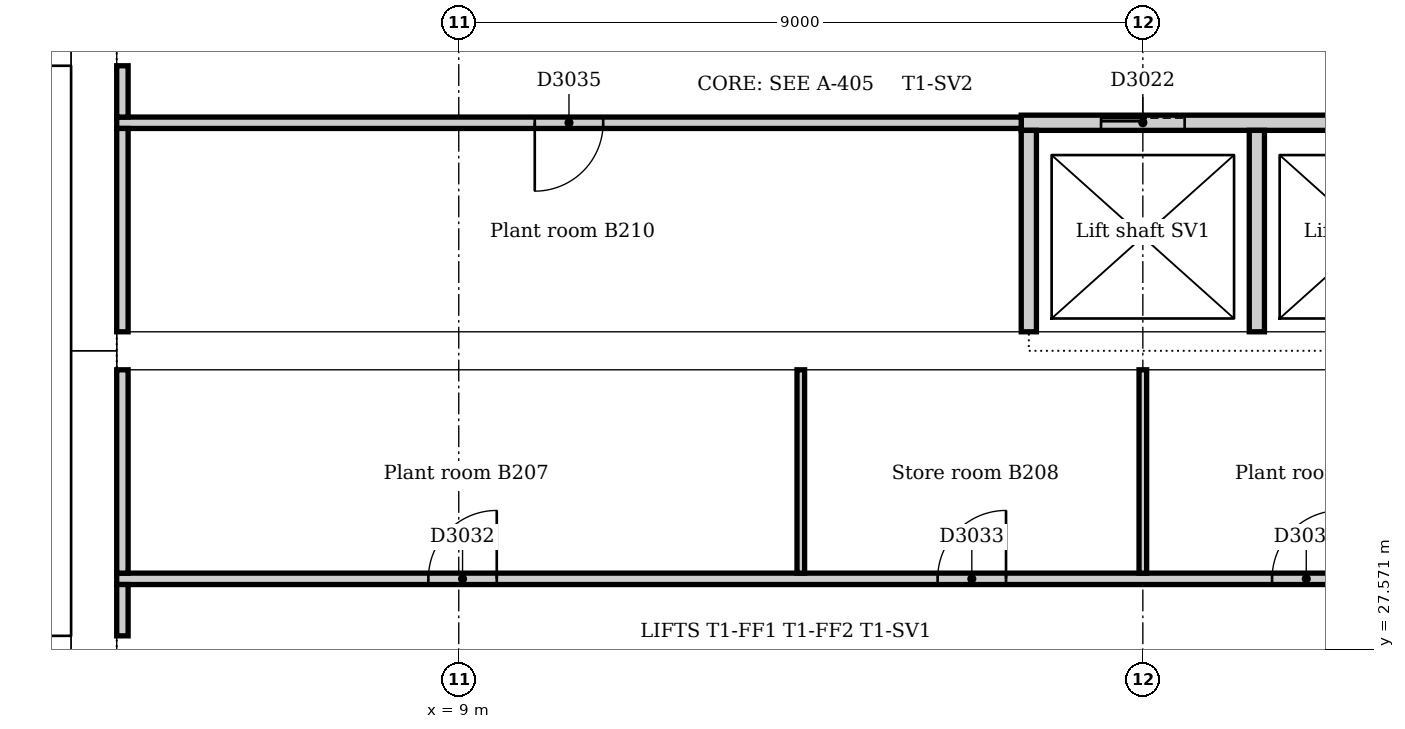
"""IFC4 building model, lengths in metres.
Left out: names, types, materials, properties, quantities, classifications, styles, units other than length and angle.
Written with IfcOpenShell. Run it as: python <this file> out.ifc"""

import sys

from ifc_helpers import new_model, si_unit, direction, frame, frame_2d, origin, place, context, subcontext, project, spatial, rectangle, extrude, element, fill, save


model = new_model("IFC4")
c1 = context("Model", 3, precision=1e-05, world=origin(), true_north=direction((0.0, 1.0)))
c2 = subcontext(c1, "Body", "Model", "MODEL_VIEW")
j1 = project(units=[si_unit("LENGTHUNIT", "METRE"), si_unit("PLANEANGLEUNIT", "RADIAN")], contexts=[c1])
p1 = place(None, origin())
s1 = spatial("IfcSite", under=j1, at=p1, CompositionType="ELEMENT")
p2 = place(p1, origin())
s2 = spatial("IfcBuilding", under=s1, at=p2, CompositionType="ELEMENT")
p3 = place(p2, frame((0.0, 0.0, -9.5)))
s3 = spatial("IfcBuildingStorey", under=s2, at=p3, CompositionType="ELEMENT", Elevation=-9.5)
p4 = place(p3, frame((4.2, 42.0, 0.0), z_axis=(0.0, 0.0, 1.0), x_axis=(0.0, -1.0, 0.0)))
e1 = element("IfcWall", 1, at=p4, inside=s3, PredefinedType="SOLIDWALL", context=c2, shape_type="SweptSolid", body=[
    extrude(rectangle(XDim=10.5, YDim=0.6, at=frame_2d((5.25, 0.0))), origin(), (0.0, 0.0, 1.0), 4.5),
])
p5 = place(p4, frame((5.3, 0.0, 0.0)))
e2 = element("IfcOpeningElement", 2, at=p5, cuts=e1, PredefinedType="OPENING", context=c2, shape_type="SweptSolid", body=[
    extrude(rectangle(XDim=1.0, YDim=2.1, at=frame_2d((0.5, 1.05))), frame((0.0, 0.31, 0.0), z_axis=(0.0, -1.0, 0.0), x_axis=(1.0, 0.0, 0.0)), (0.0, 0.0, 1.0), 0.62),
])
p6 = place(p3, frame((4.2, 31.5, 0.0), z_axis=(0.0, 0.0, 1.0), x_axis=(0.0, -1.0, 0.0)))
e3 = element("IfcWall", 3, at=p6, inside=s3, PredefinedType="SOLIDWALL", context=c2, shape_type="SweptSolid", body=[
    extrude(rectangle(XDim=10.5, YDim=0.6, at=frame_2d((5.25, 0.0))), origin(), (0.0, 0.0, 1.0), 4.5),
])
p7 = place(p6, frame((4.25, 0.0, 0.0)))
e4 = element("IfcOpeningElement", 4, at=p7, cuts=e3, PredefinedType="OPENING", context=c2, shape_type="SweptSolid", body=[
    extrude(rectangle(XDim=1.0, YDim=2.1, at=frame_2d((0.5, 1.05))), frame((0.0, 0.31, 0.0), z_axis=(0.0, -1.0, 0.0), x_axis=(1.0, 0.0, 0.0)), (0.0, 0.0, 1.0), 0.62),
])
p8 = place(p3, frame((4.5, 31.5, 0.0), z_axis=(0.0, 0.0, 1.0), x_axis=(1.0, 0.0, 0.0)))
e5 = element("IfcWall", 5, at=p8, inside=s3, PredefinedType="SOLIDWALL", context=c2, shape_type="SweptSolid", body=[
    extrude(rectangle(XDim=18.0, YDim=0.5, at=frame_2d((9.0, 0.0))), origin(), (0.0, 0.0, 1.0), 4.5),
])
p9 = place(p3, frame((3.9, 27.625, 0.0), z_axis=(0.0, 0.0, 1.0), x_axis=(-1.0, 0.0, 0.0)))
e6 = element("IfcWall", 6, at=p9, inside=s3, PredefinedType="SOLIDWALL", context=c2, shape_type="SweptSolid", body=[
    extrude(rectangle(XDim=3.54, YDim=0.25, at=frame_2d((1.77, 0.0))), origin(), (0.0, 0.0, 1.0), 4.5),
])
p10 = place(p9, frame((0.4, 0.0, 0.0)))
e7 = element("IfcOpeningElement", 7, at=p10, cuts=e6, PredefinedType="OPENING", context=c2, shape_type="SweptSolid", body=[
    extrude(rectangle(XDim=1.0, YDim=2.1, at=frame_2d((0.5, 1.05))), frame((0.0, 0.135, 0.0), z_axis=(0.0, -1.0, 0.0), x_axis=(1.0, 0.0, 0.0)), (0.0, 0.0, 1.0), 0.27),
])
p11 = place(p3, frame((0.36, 35.375, 0.0), z_axis=(0.0, 0.0, 1.0), x_axis=(1.0, 0.0, 0.0)))
e8 = element("IfcWall", 8, at=p11, inside=s3, PredefinedType="SOLIDWALL", context=c2, shape_type="SweptSolid", body=[
    extrude(rectangle(XDim=3.54, YDim=0.25, at=frame_2d((1.77, 0.0))), origin(), (0.0, 0.0, 1.0), 4.5),
])
p12 = place(p11, frame((2.14, 0.0, 0.0)))
e9 = element("IfcOpeningElement", 9, at=p12, cuts=e8, PredefinedType="OPENING", context=c2, shape_type="SweptSolid", body=[
    extrude(rectangle(XDim=1.0, YDim=2.1, at=frame_2d((0.5, 1.05))), frame((0.0, 0.135, 0.0), z_axis=(0.0, -1.0, 0.0), x_axis=(1.0, 0.0, 0.0)), (0.0, 0.0, 1.0), 0.27),
])
p13 = place(p3, frame((16.4, 34.5, 0.0), z_axis=(0.0, 0.0, 1.0), x_axis=(1.0, 0.0, 0.0)))
e10 = element("IfcWall", 10, at=p13, inside=s3, PredefinedType="PARTITIONING", context=c2, shape_type="SweptSolid", body=[
    extrude(rectangle(XDim=6.1, YDim=0.2, at=frame_2d((3.05, 0.0))), origin(), (0.0, 0.0, 1.0), 4.15),
])
p14 = place(p13, frame((1.05, 0.0, 0.0)))
e11 = element("IfcOpeningElement", 11, at=p14, cuts=e10, PredefinedType="OPENING", context=c2, shape_type="SweptSolid", body=[
    extrude(rectangle(XDim=1.1, YDim=2.1, at=frame_2d((0.55, 1.05))), frame((0.0, 0.11, 0.0), z_axis=(0.0, -1.0, 0.0), x_axis=(1.0, 0.0, 0.0)), (0.0, 0.0, 1.0), 0.22),
])
p15 = place(p13, frame((4.05, 0.0, 0.0)))
e12 = element("IfcOpeningElement", 12, at=p15, cuts=e10, PredefinedType="OPENING", context=c2, shape_type="SweptSolid", body=[
    extrude(rectangle(XDim=1.1, YDim=2.1, at=frame_2d((0.55, 1.05))), frame((0.0, 0.11, 0.0), z_axis=(0.0, -1.0, 0.0), x_axis=(1.0, 0.0, 0.0)), (0.0, 0.0, 1.0), 0.22),
])
for number, where, z_axis, x_axis in (
    (13, (16.5, 31.75, 0.0), (0.0, 0.0, 1.0), (0.0, 1.0, 0.0)),
    (14, (19.5, 31.75, 0.0), (0.0, 0.0, 1.0), (0.0, 1.0, 0.0)),
):
    element("IfcWall", number, at=place(p3, frame(where, z_axis=z_axis, x_axis=x_axis)), inside=s3, PredefinedType="PARTITIONING", context=c2, shape_type="SweptSolid", body=[
        extrude(rectangle(XDim=2.65, YDim=0.2, at=frame_2d((1.325, 0.0))), origin(), (0.0, 0.0, 1.0), 4.15),
    ])
p16 = place(p3, frame((4.5, 28.5, 0.0), z_axis=(0.0, 0.0, 1.0), x_axis=(1.0, 0.0, 0.0)))
e15 = element("IfcWall", 15, at=p16, inside=s3, PredefinedType="PARTITIONING", context=c2, shape_type="SweptSolid", body=[
    extrude(rectangle(XDim=18.0, YDim=0.15, at=frame_2d((9.0, 0.0))), origin(), (0.0, 0.0, 1.0), 4.15),
])
p17 = place(p16, frame((4.1, 0.0, 0.0)))
e16 = element("IfcOpeningElement", 16, at=p17, cuts=e15, PredefinedType="OPENING", context=c2, shape_type="SweptSolid", body=[
    extrude(rectangle(XDim=0.9, YDim=2.1, at=frame_2d((0.45, 1.05))), frame((0.0, 0.085, 0.0), z_axis=(0.0, -1.0, 0.0), x_axis=(1.0, 0.0, 0.0)), (0.0, 0.0, 1.0), 0.17),
])
p18 = place(p16, frame((10.8, 0.0, 0.0)))
e17 = element("IfcOpeningElement", 17, at=p18, cuts=e15, PredefinedType="OPENING", context=c2, shape_type="SweptSolid", body=[
    extrude(rectangle(XDim=0.9, YDim=2.1, at=frame_2d((0.45, 1.05))), frame((0.0, 0.085, 0.0), z_axis=(0.0, -1.0, 0.0), x_axis=(1.0, 0.0, 0.0)), (0.0, 0.0, 1.0), 0.17),
])
p19 = place(p16, frame((15.2, 0.0, 0.0)))
e18 = element("IfcOpeningElement", 18, at=p19, cuts=e15, PredefinedType="OPENING", context=c2, shape_type="SweptSolid", body=[
    extrude(rectangle(XDim=0.9, YDim=2.1, at=frame_2d((0.45, 1.05))), frame((0.0, 0.085, 0.0), z_axis=(0.0, -1.0, 0.0), x_axis=(1.0, 0.0, 0.0)), (0.0, 0.0, 1.0), 0.17),
])
p20 = place(p3, frame((4.5, 34.5, 0.0), z_axis=(0.0, 0.0, 1.0), x_axis=(1.0, 0.0, 0.0)))
e19 = element("IfcWall", 19, at=p20, inside=s3, PredefinedType="PARTITIONING", context=c2, shape_type="SweptSolid", body=[
    extrude(rectangle(XDim=11.9, YDim=0.15, at=frame_2d((5.95, 0.0))), origin(), (0.0, 0.0, 1.0), 4.15),
])
p21 = place(p20, frame((5.5, 0.0, 0.0)))
e20 = element("IfcOpeningElement", 20, at=p21, cuts=e19, PredefinedType="OPENING", context=c2, shape_type="SweptSolid", body=[
    extrude(rectangle(XDim=0.9, YDim=2.1, at=frame_2d((0.45, 1.05))), frame((0.0, 0.085, 0.0), z_axis=(0.0, -1.0, 0.0), x_axis=(1.0, 0.0, 0.0)), (0.0, 0.0, 1.0), 0.17),
])
p22 = place(p3, frame((4.575, 34.575, 0.0), z_axis=(0.0, 0.0, 1.0), x_axis=(0.0, 1.0, 0.0)))
e21 = element("IfcWall", 21, at=p22, inside=s3, PredefinedType="PARTITIONING", context=c2, shape_type="SweptSolid", body=[
    extrude(rectangle(XDim=0.675, YDim=0.15, at=frame_2d((0.338, 0.0))), origin(), (0.0, 0.0, 1.0), 4.15),
])
p23 = place(p3, frame((4.575, 31.75, 0.0), z_axis=(0.0, 0.0, 1.0), x_axis=(0.0, 1.0, 0.0)))
e22 = element("IfcWall", 22, at=p23, inside=s3, PredefinedType="PARTITIONING", context=c2, shape_type="SweptSolid", body=[
    extrude(rectangle(XDim=2.675, YDim=0.15, at=frame_2d((1.337, 0.0))), origin(), (0.0, 0.0, 1.0), 4.15),
])
p24 = place(p3, frame((4.575, 27.75, 0.0), z_axis=(0.0, 0.0, 1.0), x_axis=(0.0, 1.0, 0.0)))
e23 = element("IfcWall", 23, at=p24, inside=s3, PredefinedType="PARTITIONING", context=c2, shape_type="SweptSolid", body=[
    extrude(rectangle(XDim=0.675, YDim=0.15, at=frame_2d((0.338, 0.0))), origin(), (0.0, 0.0, 1.0), 4.15),
])
p25 = place(p3, frame((4.575, 28.575, 0.0), z_axis=(0.0, 0.0, 1.0), x_axis=(0.0, 1.0, 0.0)))
e24 = element("IfcWall", 24, at=p25, inside=s3, PredefinedType="PARTITIONING", context=c2, shape_type="SweptSolid", body=[
    extrude(rectangle(XDim=2.675, YDim=0.15, at=frame_2d((1.337, 0.0))), origin(), (0.0, 0.0, 1.0), 4.15),
])
for number, where, z_axis, x_axis in (
    (25, (13.5, 28.575, 0.0), (0.0, 0.0, 1.0), (0.0, 1.0, 0.0)),
    (26, (18.0, 28.575, 0.0), (0.0, 0.0, 1.0), (0.0, 1.0, 0.0)),
):
    element("IfcWall", number, at=place(p3, frame(where, z_axis=z_axis, x_axis=x_axis)), inside=s3, PredefinedType="PARTITIONING", context=c2, shape_type="SweptSolid", body=[
        extrude(rectangle(XDim=2.675, YDim=0.1, at=frame_2d((1.337, 0.0))), origin(), (0.0, 0.0, 1.0), 4.15),
    ])
p26 = place(p14, origin())
e27 = element("IfcDoor", 27, at=p26, inside=s3, OperationType="SLIDING_TO_LEFT", PredefinedType="DOOR", context=c2, shape_type="SweptSolid", body=[
    extrude(rectangle(XDim=1.1, YDim=2.1, at=frame_2d((0.55, 1.05))), frame((0.0, 0.025, 0.0), z_axis=(0.0, -1.0, 0.0), x_axis=(1.0, 0.0, 0.0)), (0.0, 0.0, 1.0), 0.05),
])
fill(e11, e27)
p27 = place(p17, origin())
e28 = element("IfcDoor", 28, at=p27, inside=s3, OperationType="SINGLE_SWING_RIGHT", PredefinedType="DOOR", context=c2, shape_type="SweptSolid", body=[
    extrude(rectangle(XDim=0.9, YDim=2.1, at=frame_2d((0.45, 1.05))), frame((0.0, 0.025, 0.0), z_axis=(0.0, -1.0, 0.0), x_axis=(1.0, 0.0, 0.0)), (0.0, 0.0, 1.0), 0.05),
])
fill(e16, e28)
p28 = place(p18, origin())
e29 = element("IfcDoor", 29, at=p28, inside=s3, OperationType="SINGLE_SWING_RIGHT", PredefinedType="DOOR", context=c2, shape_type="SweptSolid", body=[
    extrude(rectangle(XDim=0.9, YDim=2.1, at=frame_2d((0.45, 1.05))), frame((0.0, 0.025, 0.0), z_axis=(0.0, -1.0, 0.0), x_axis=(1.0, 0.0, 0.0)), (0.0, 0.0, 1.0), 0.05),
])
fill(e17, e29)
p29 = place(p19, origin())
e30 = element("IfcDoor", 30, at=p29, inside=s3, OperationType="SINGLE_SWING_RIGHT", PredefinedType="DOOR", context=c2, shape_type="SweptSolid", body=[
    extrude(rectangle(XDim=0.9, YDim=2.1, at=frame_2d((0.45, 1.05))), frame((0.0, 0.025, 0.0), z_axis=(0.0, -1.0, 0.0), x_axis=(1.0, 0.0, 0.0)), (0.0, 0.0, 1.0), 0.05),
])
fill(e18, e30)
p30 = place(p21, frame((0.9, 0.0, 0.0), z_axis=(0.0, 0.0, 1.0), x_axis=(-1.0, 0.0, 0.0)))
e31 = element("IfcDoor", 31, at=p30, inside=s3, OperationType="SINGLE_SWING_RIGHT", PredefinedType="DOOR", context=c2, shape_type="SweptSolid", body=[
    extrude(rectangle(XDim=0.9, YDim=2.1, at=frame_2d((0.45, 1.05))), frame((0.0, 0.025, 0.0), z_axis=(0.0, -1.0, 0.0), x_axis=(1.0, 0.0, 0.0)), (0.0, 0.0, 1.0), 0.05),
])
fill(e20, e31)
save(model, sys.argv[1])
